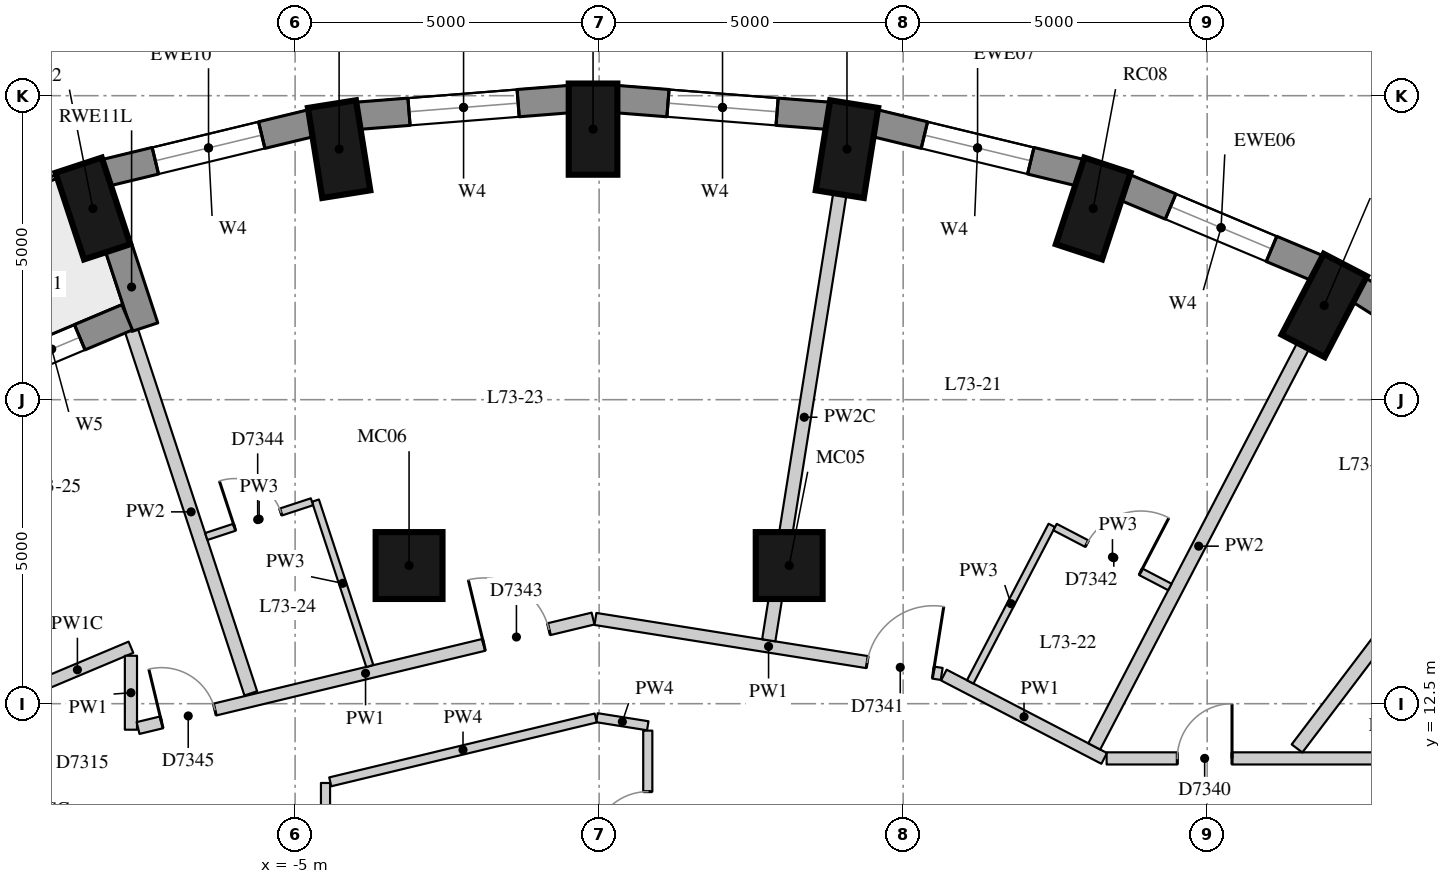
"""IFC4 building model, lengths in metres.
Left out: names, types, materials, properties, quantities, classifications, styles, units other than length and angle.
Written with IfcOpenShell. Run it as: python <this file> out.ifc"""

import sys

from ifc_helpers import new_model, si_unit, direction, frame, frame_2d, origin, origin_2d, place, context, subcontext, project, spatial, rectangle, extrude, element, fill, save


model = new_model("IFC4")
c1 = context("Model", 3, precision=1e-05, world=origin(), true_north=direction((0.0, 1.0)))
c2 = subcontext(c1, "Body", "Model", "MODEL_VIEW")
j1 = project(units=[si_unit("LENGTHUNIT", "METRE"), si_unit("PLANEANGLEUNIT", "RADIAN")], contexts=[c1])
p1 = place(None, origin())
s1 = spatial("IfcSite", under=j1, at=p1, CompositionType="ELEMENT")
p2 = place(p1, origin())
s2 = spatial("IfcBuilding", under=s1, at=p2, CompositionType="ELEMENT")
p3 = place(p2, frame((0.0, 0.0, 256.4)))
s3 = spatial("IfcBuildingStorey", under=s2, at=p3, CompositionType="ELEMENT", Elevation=256.4)
for number, where, z_axis, x_axis in (
    (1, (11.925, 19.05, 0.0), (0.0, 0.0, 1.0), (0.462, 0.887, 0.0)),
    (2, (8.125, 20.644, 0.0), (0.0, 0.0, 1.0), (0.312, 0.95, 0.0)),
    (3, (4.076, 21.621, 0.0), (0.0, 0.0, 1.0), (0.157, 0.988, 0.0)),
    (4, (-0.1, 21.95, 0.0), (0.0, 0.0, 1.0), (0.0, 1.0, 0.0)),
    (5, (-4.276, 21.621, 0.0), (0.0, 0.0, 1.0), (-0.157, 0.988, 0.0)),
    (6, (-8.326, 20.644, 0.0), (0.0, 0.0, 1.0), (-0.312, 0.95, 0.0)),
):
    element("IfcColumn", number, at=place(p3, frame(where, z_axis=z_axis, x_axis=x_axis)), inside=s3, PredefinedType="COLUMN", context=c2, shape_type="SweptSolid", body=[
        extrude(rectangle(XDim=1.5, YDim=0.8, at=origin_2d()), origin(), (0.0, 0.0, 1.0), 3.3),
    ])
for number, where, z_axis, x_axis in (
    (7, (3.126, 14.772, 0.0), (0.0, 0.0, 1.0), (1.0, 0.0, 0.0)),
    (8, (-3.126, 14.772, 0.0), (0.0, 0.0, 1.0), (1.0, 0.0, 0.0)),
):
    element("IfcColumn", number, at=place(p3, frame(where, z_axis=z_axis, x_axis=x_axis)), inside=s3, PredefinedType="COLUMN", context=c2, shape_type="SweptSolid", body=[
        extrude(rectangle(XDim=1.1, YDim=1.1, at=origin_2d()), origin(), (0.0, 0.0, 1.0), 3.3),
    ])
p4 = place(p3, frame((15.353, 17.506, 0.0), z_axis=(0.0, 0.0, 1.0), x_axis=(-0.845929139811, 0.53329531258, 0.0)))
e9 = element("IfcWall", 9, at=p4, inside=s3, PredefinedType="SOLIDWALL", context=c2, shape_type="SweptSolid", body=[
    extrude(rectangle(XDim=3.385, YDim=0.45, at=frame_2d((1.692, 0.0))), origin(), (0.0, 0.0, 1.0), 2.95),
])
p5 = place(p4, frame((0.792, 0.0, 0.4)))
e10 = element("IfcOpeningElement", 10, at=p5, cuts=e9, PredefinedType="OPENING", context=c2, shape_type="SweptSolid", body=[
    extrude(rectangle(XDim=1.8, YDim=1.75, at=frame_2d((0.9, 0.875))), frame((0.0, 0.235, 0.0), z_axis=(0.0, -1.0, 0.0), x_axis=(1.0, 0.0, 0.0)), (0.0, 0.0, 1.0), 0.47),
])
p6 = place(p3, frame((11.816, 19.662, 0.0), z_axis=(0.0, 0.0, 1.0), x_axis=(-0.922024627475, 0.387131226239, 0.0)))
e11 = element("IfcWall", 11, at=p6, inside=s3, PredefinedType="SOLIDWALL", context=c2, shape_type="SweptSolid", body=[
    extrude(rectangle(XDim=3.443, YDim=0.45, at=frame_2d((1.722, 0.0))), origin(), (0.0, 0.0, 1.0), 2.95),
])
p7 = place(p6, frame((0.822, 0.0, 0.4)))
e12 = element("IfcOpeningElement", 12, at=p7, cuts=e11, PredefinedType="OPENING", context=c2, shape_type="SweptSolid", body=[
    extrude(rectangle(XDim=1.8, YDim=1.75, at=frame_2d((0.9, 0.875))), frame((0.0, 0.235, 0.0), z_axis=(0.0, -1.0, 0.0), x_axis=(1.0, 0.0, 0.0)), (0.0, 0.0, 1.0), 0.47),
])
p8 = place(p3, frame((7.919, 21.232, 0.0), z_axis=(0.0, 0.0, 1.0), x_axis=(-0.972099278496, 0.23456980357, 0.0)))
e13 = element("IfcWall", 13, at=p8, inside=s3, PredefinedType="SOLIDWALL", context=c2, shape_type="SweptSolid", body=[
    extrude(rectangle(XDim=3.487, YDim=0.45, at=frame_2d((1.743, 0.0))), origin(), (0.0, 0.0, 1.0), 2.95),
])
p9 = place(p8, frame((0.843, 0.0, 0.4)))
e14 = element("IfcOpeningElement", 14, at=p9, cuts=e13, PredefinedType="OPENING", context=c2, shape_type="SweptSolid", body=[
    extrude(rectangle(XDim=1.8, YDim=1.75, at=frame_2d((0.9, 0.875))), frame((0.0, 0.235, 0.0), z_axis=(0.0, -1.0, 0.0), x_axis=(1.0, 0.0, 0.0)), (0.0, 0.0, 1.0), 0.47),
])
p10 = place(p3, frame((3.779, 22.169, 0.0), z_axis=(0.0, 0.0, 1.0), x_axis=(-0.996910775835, 0.078542377245, 0.0)))
e15 = element("IfcWall", 15, at=p10, inside=s3, PredefinedType="SOLIDWALL", context=c2, shape_type="SweptSolid", body=[
    extrude(rectangle(XDim=3.509, YDim=0.45, at=frame_2d((1.755, 0.0))), origin(), (0.0, 0.0, 1.0), 2.95),
])
p11 = place(p10, frame((0.855, 0.0, 0.4)))
e16 = element("IfcOpeningElement", 16, at=p11, cuts=e15, PredefinedType="OPENING", context=c2, shape_type="SweptSolid", body=[
    extrude(rectangle(XDim=1.8, YDim=1.75, at=frame_2d((0.9, 0.875))), frame((0.0, 0.235, 0.0), z_axis=(0.0, -1.0, 0.0), x_axis=(1.0, 0.0, 0.0)), (0.0, 0.0, 1.0), 0.47),
])
p12 = place(p3, frame((-0.48, 22.444, 0.0), z_axis=(0.0, 0.0, 1.0), x_axis=(-0.996910775835, -0.078542377245, 0.0)))
e17 = element("IfcWall", 17, at=p12, inside=s3, PredefinedType="SOLIDWALL", context=c2, shape_type="SweptSolid", body=[
    extrude(rectangle(XDim=3.509, YDim=0.45, at=frame_2d((1.755, 0.0))), origin(), (0.0, 0.0, 1.0), 2.95),
])
p13 = place(p12, frame((0.855, 0.0, 0.4)))
e18 = element("IfcOpeningElement", 18, at=p13, cuts=e17, PredefinedType="OPENING", context=c2, shape_type="SweptSolid", body=[
    extrude(rectangle(XDim=1.8, YDim=1.75, at=frame_2d((0.9, 0.875))), frame((0.0, 0.235, 0.0), z_axis=(0.0, -1.0, 0.0), x_axis=(1.0, 0.0, 0.0)), (0.0, 0.0, 1.0), 0.47),
])
p14 = place(p3, frame((-4.729, 22.05, 0.0), z_axis=(0.0, 0.0, 1.0), x_axis=(-0.972099278496, -0.23456980357, 0.0)))
e19 = element("IfcWall", 19, at=p14, inside=s3, PredefinedType="SOLIDWALL", context=c2, shape_type="SweptSolid", body=[
    extrude(rectangle(XDim=3.487, YDim=0.45, at=frame_2d((1.743, 0.0))), origin(), (0.0, 0.0, 1.0), 2.95),
])
p15 = place(p14, frame((0.843, 0.0, 0.4)))
e20 = element("IfcOpeningElement", 20, at=p15, cuts=e19, PredefinedType="OPENING", context=c2, shape_type="SweptSolid", body=[
    extrude(rectangle(XDim=1.8, YDim=1.75, at=frame_2d((0.9, 0.875))), frame((0.0, 0.235, 0.0), z_axis=(0.0, -1.0, 0.0), x_axis=(1.0, 0.0, 0.0)), (0.0, 0.0, 1.0), 0.47),
])
p16 = place(p3, frame((-7.906, 20.014, 0.0), z_axis=(0.0, 0.0, 1.0), x_axis=(0.312379684595, -0.949957332017, 0.0)))
e21 = element("IfcWall", 21, at=p16, inside=s3, PredefinedType="SOLIDWALL", context=c2, shape_type="SweptSolid", body=[
    extrude(rectangle(XDim=1.39, YDim=0.45, at=frame_2d((0.695, 0.0))), origin(), (0.0, 0.0, 1.0), 2.95),
])
p17 = place(p3, frame((-7.762, 18.855, 0.0), z_axis=(0.0, 0.0, 1.0), x_axis=(-0.921611451737, -0.388113813239, 0.0)))
e22 = element("IfcWall", 22, at=p17, inside=s3, PredefinedType="SOLIDWALL", context=c2, shape_type="SweptSolid", body=[
    extrude(rectangle(XDim=3.842, YDim=0.45, at=frame_2d((1.921, 0.0))), origin(), (0.0, 0.0, 1.0), 2.95),
])
p18 = place(p17, frame((0.846, 0.0, 0.4)))
e23 = element("IfcOpeningElement", 23, at=p18, cuts=e22, PredefinedType="OPENING", context=c2, shape_type="SweptSolid", body=[
    extrude(rectangle(XDim=1.0, YDim=1.75, at=frame_2d((0.5, 0.875))), frame((0.0, 0.235, 0.0), z_axis=(0.0, -1.0, 0.0), x_axis=(1.0, 0.0, 0.0)), (0.0, 0.0, 1.0), 0.47),
])
p19 = place(p17, frame((1.996, 0.0, 0.0)))
e24 = element("IfcOpeningElement", 24, at=p19, cuts=e22, PredefinedType="OPENING", context=c2, shape_type="SweptSolid", body=[
    extrude(rectangle(XDim=1.0, YDim=2.15, at=frame_2d((0.5, 1.075))), frame((0.0, 0.235, 0.0), z_axis=(0.0, -1.0, 0.0), x_axis=(1.0, 0.0, 0.0)), (0.0, 0.0, 1.0), 0.47),
])
p20 = place(p3, frame((-9.46, 12.687, 0.0), z_axis=(0.0, 0.0, 1.0), x_axis=(0.92164499827, 0.388034144328, 0.0)))
e25 = element("IfcWall", 25, at=p20, inside=s3, PredefinedType="PARTITIONING", context=c2, shape_type="SweptSolid", body=[
    extrude(rectangle(XDim=1.91, YDim=0.2, at=frame_2d((0.955, 0.0))), origin(), (0.0, 0.0, 1.0), 2.5),
])
p21 = place(p3, frame((-7.7, 13.288, 0.0), z_axis=(0.0, 0.0, 1.0), x_axis=(0.0, -1.0, 0.0)))
e26 = element("IfcWall", 26, at=p21, inside=s3, PredefinedType="PARTITIONING", context=c2, shape_type="SweptSolid", body=[
    extrude(rectangle(XDim=1.216, YDim=0.2, at=frame_2d((0.608, 0.0))), origin(), (0.0, 0.0, 1.0), 2.95),
])
p22 = place(p3, frame((-7.583, 12.1, 0.0), z_axis=(0.0, 0.0, 1.0), x_axis=(0.97226305798, 0.233890029903, 0.0)))
e27 = element("IfcWall", 27, at=p22, inside=s3, PredefinedType="PARTITIONING", context=c2, shape_type="SweptSolid", body=[
    extrude(rectangle(XDim=7.696, YDim=0.2, at=frame_2d((3.848, 0.0))), origin(), (0.0, 0.0, 1.0), 2.95),
])
p23 = place(p22, frame((5.85, 0.0, 0.0)))
e28 = element("IfcOpeningElement", 28, at=p23, cuts=e27, PredefinedType="OPENING", context=c2, shape_type="SweptSolid", body=[
    extrude(rectangle(XDim=1.1, YDim=2.1, at=frame_2d((0.55, 1.05))), frame((0.0, 0.11, 0.0), z_axis=(0.0, -1.0, 0.0), x_axis=(1.0, 0.0, 0.0)), (0.0, 0.0, 1.0), 0.22),
])
p24 = place(p22, frame((0.399, 0.0, 0.0)))
e29 = element("IfcOpeningElement", 29, at=p24, cuts=e27, PredefinedType="OPENING", context=c2, shape_type="SweptSolid", body=[
    extrude(rectangle(XDim=0.9, YDim=2.1, at=frame_2d((0.45, 1.05))), frame((0.0, 0.11, 0.0), z_axis=(0.0, -1.0, 0.0), x_axis=(1.0, 0.0, 0.0)), (0.0, 0.0, 1.0), 0.22),
])
p25 = place(p3, frame((-0.061, 13.894, 0.0), z_axis=(0.0, 0.0, 1.0), x_axis=(0.987623870558, -0.156840971383, 0.0)))
e30 = element("IfcWall", 30, at=p25, inside=s3, PredefinedType="PARTITIONING", context=c2, shape_type="SweptSolid", body=[
    extrude(rectangle(XDim=5.766, YDim=0.2, at=frame_2d((2.883, 0.0))), origin(), (0.0, 0.0, 1.0), 2.95),
])
p26 = place(p25, frame((4.526, 0.0, 0.0)))
e31 = element("IfcOpeningElement", 31, at=p26, cuts=e30, PredefinedType="OPENING", context=c2, shape_type="SweptSolid", body=[
    extrude(rectangle(XDim=1.1, YDim=2.1, at=frame_2d((0.55, 1.05))), frame((0.0, 0.11, 0.0), z_axis=(0.0, -1.0, 0.0), x_axis=(1.0, 0.0, 0.0)), (0.0, 0.0, 1.0), 0.22),
])
p27 = place(p3, frame((5.669, 12.971, 0.0), z_axis=(0.0, 0.0, 1.0), x_axis=(0.887284047921, -0.461223393058, 0.0)))
e32 = element("IfcWall", 32, at=p27, inside=s3, PredefinedType="PARTITIONING", context=c2, shape_type="SweptSolid", body=[
    extrude(rectangle(XDim=2.972, YDim=0.2, at=frame_2d((1.486, 0.0))), origin(), (0.0, 0.0, 1.0), 2.95),
])
p28 = place(p3, frame((8.346, 11.6, 0.0), z_axis=(0.0, 0.0, 1.0), x_axis=(1.0, 0.0, 0.0)))
e33 = element("IfcWall", 33, at=p28, inside=s3, PredefinedType="PARTITIONING", context=c2, shape_type="SweptSolid", body=[
    extrude(rectangle(XDim=9.254, YDim=0.2, at=frame_2d((4.627, 0.0))), origin(), (0.0, 0.0, 1.0), 2.95),
])
p29 = place(p28, frame((1.162, 0.0, 0.0)))
e34 = element("IfcOpeningElement", 34, at=p29, cuts=e33, PredefinedType="OPENING", context=c2, shape_type="SweptSolid", body=[
    extrude(rectangle(XDim=0.9, YDim=2.1, at=frame_2d((0.45, 1.05))), frame((0.0, 0.11, 0.0), z_axis=(0.0, -1.0, 0.0), x_axis=(1.0, 0.0, 0.0)), (0.0, 0.0, 1.0), 0.22),
])
p30 = place(p28, frame((5.224, 0.0, 0.0)))
e35 = element("IfcOpeningElement", 35, at=p30, cuts=e33, PredefinedType="OPENING", context=c2, shape_type="SweptSolid", body=[
    extrude(rectangle(XDim=1.8, YDim=2.1, at=frame_2d((0.9, 1.05))), frame((0.0, 0.11, 0.0), z_axis=(0.0, -1.0, 0.0), x_axis=(1.0, 0.0, 0.0)), (0.0, 0.0, 1.0), 0.22),
])
p31 = place(p3, frame((-0.036, 12.27, 0.0), z_axis=(0.0, 0.0, 1.0), x_axis=(0.987612834354, -0.156910450318, 0.0)))
e36 = element("IfcWall", 36, at=p31, inside=s3, PredefinedType="PARTITIONING", context=c2, shape_type="SweptSolid", body=[
    extrude(rectangle(XDim=0.846, YDim=0.15, at=frame_2d((0.423, 0.0))), origin(), (0.0, 0.0, 1.0), 2.95),
])
p32 = place(p3, frame((0.8, 12.057, 0.0), z_axis=(0.0, 0.0, 1.0), x_axis=(0.0, -1.0, 0.0)))
e37 = element("IfcWall", 37, at=p32, inside=s3, PredefinedType="PARTITIONING", context=c2, shape_type="SweptSolid", body=[
    extrude(rectangle(XDim=2.907, YDim=0.15, at=frame_2d((1.454, 0.0))), origin(), (0.0, 0.0, 1.0), 2.95),
])
p33 = place(p32, frame((1.003, 0.0, 0.0)))
e38 = element("IfcOpeningElement", 38, at=p33, cuts=e37, PredefinedType="OPENING", context=c2, shape_type="SweptSolid", body=[
    extrude(rectangle(XDim=0.9, YDim=2.1, at=frame_2d((0.45, 1.05))), frame((0.0, 0.085, 0.0), z_axis=(0.0, -1.0, 0.0), x_axis=(1.0, 0.0, 0.0)), (0.0, 0.0, 1.0), 0.17),
])
p34 = place(p3, frame((-4.5, 8.563, 0.0), z_axis=(0.0, 0.0, 1.0), x_axis=(0.0, 1.0, 0.0)))
e39 = element("IfcWall", 39, at=p34, inside=s3, PredefinedType="PARTITIONING", context=c2, shape_type="SweptSolid", body=[
    extrude(rectangle(XDim=2.633, YDim=0.15, at=frame_2d((1.316, 0.0))), origin(), (0.0, 0.0, 1.0), 2.95),
])
p35 = place(p3, frame((-4.422, 11.215, 0.0), z_axis=(0.0, 0.0, 1.0), x_axis=(0.972256385538, 0.233917764997, 0.0)))
e40 = element("IfcWall", 40, at=p35, inside=s3, PredefinedType="PARTITIONING", context=c2, shape_type="SweptSolid", body=[
    extrude(rectangle(XDim=4.491, YDim=0.15, at=frame_2d((2.246, 0.0))), origin(), (0.0, 0.0, 1.0), 2.95),
])
p36 = place(p3, frame((14.906, 16.287, 0.0), z_axis=(0.0, 0.0, 1.0), x_axis=(-0.604066355306, -0.796934023861, 0.0)))
e41 = element("IfcWall", 41, at=p36, inside=s3, PredefinedType="PARTITIONING", context=c2, shape_type="SweptSolid", body=[
    extrude(rectangle(XDim=5.676, YDim=0.22, at=frame_2d((2.838, 0.0))), origin(), (0.0, 0.0, 1.0), 2.95),
])
p37 = place(p3, frame((11.578, 18.385, 0.0), z_axis=(0.0, 0.0, 1.0), x_axis=(-0.462371689287, -0.886686202073, 0.0)))
e42 = element("IfcWall", 42, at=p37, inside=s3, PredefinedType="PARTITIONING", context=c2, shape_type="SweptSolid", body=[
    extrude(rectangle(XDim=7.429, YDim=0.22, at=frame_2d((3.714, 0.0))), origin(), (0.0, 0.0, 1.0), 2.95),
])
p38 = place(p3, frame((3.958, 20.88, 0.0), z_axis=(0.0, 0.0, 1.0), x_axis=(-0.157281826031, -0.987553759144, 0.0)))
e43 = element("IfcWall", 43, at=p38, inside=s3, PredefinedType="PARTITIONING", context=c2, shape_type="SweptSolid", body=[
    extrude(rectangle(XDim=7.431, YDim=0.22, at=frame_2d((3.715, 0.0))), origin(), (0.0, 0.0, 1.0), 2.5),
])
p39 = place(p3, frame((-7.692, 18.64, 0.0), z_axis=(0.0, 0.0, 1.0), x_axis=(0.312298025569, -0.949984180514, 0.0)))
e44 = element("IfcWall", 44, at=p39, inside=s3, PredefinedType="PARTITIONING", context=c2, shape_type="SweptSolid", body=[
    extrude(rectangle(XDim=6.285, YDim=0.22, at=frame_2d((3.143, 0.0))), origin(), (0.0, 0.0, 1.0), 2.95),
])
p40 = place(p3, frame((6.103, 12.858, 0.0), z_axis=(0.0, 0.0, 1.0), x_axis=(0.462353319711, 0.886695780836, 0.0)))
e45 = element("IfcWall", 45, at=p40, inside=s3, PredefinedType="PARTITIONING", context=c2, shape_type="SweptSolid", body=[
    extrude(rectangle(XDim=2.903, YDim=0.12, at=frame_2d((1.452, 0.0))), origin(), (0.0, 0.0, 1.0), 2.95),
])
p41 = place(p3, frame((-3.771, 13.12, 0.0), z_axis=(0.0, 0.0, 1.0), x_axis=(-0.312336886671, 0.949971404425, 0.0)))
e46 = element("IfcWall", 46, at=p41, inside=s3, PredefinedType="PARTITIONING", context=c2, shape_type="SweptSolid", body=[
    extrude(rectangle(XDim=2.863, YDim=0.12, at=frame_2d((1.432, 0.0))), origin(), (0.0, 0.0, 1.0), 2.95),
])
p42 = place(p3, frame((7.498, 15.405, 0.0), z_axis=(0.0, 0.0, 1.0), x_axis=(0.886662502683, -0.46241713456, 0.0)))
e47 = element("IfcWall", 47, at=p42, inside=s3, PredefinedType="PARTITIONING", context=c2, shape_type="SweptSolid", body=[
    extrude(rectangle(XDim=2.13, YDim=0.12, at=frame_2d((1.065, 0.0))), origin(), (0.0, 0.0, 1.0), 2.95),
])
p43 = place(p42, frame((0.59, 0.0, 0.0)))
e48 = element("IfcOpeningElement", 48, at=p43, cuts=e47, PredefinedType="OPENING", context=c2, shape_type="SweptSolid", body=[
    extrude(rectangle(XDim=1.0, YDim=2.1, at=frame_2d((0.5, 1.05))), frame((0.0, 0.07, 0.0), z_axis=(0.0, -1.0, 0.0), x_axis=(1.0, 0.0, 0.0)), (0.0, 0.0, 1.0), 0.14),
])
p44 = place(p3, frame((-4.722, 15.821, 0.0), z_axis=(0.0, 0.0, 1.0), x_axis=(-0.949995576072, -0.312263359111, 0.0)))
e49 = element("IfcWall", 49, at=p44, inside=s3, PredefinedType="PARTITIONING", context=c2, shape_type="SweptSolid", body=[
    extrude(rectangle(XDim=1.83, YDim=0.12, at=frame_2d((0.915, 0.0))), origin(), (0.0, 0.0, 1.0), 2.95),
])
p45 = place(p44, frame((0.54, 0.0, 0.0)))
e50 = element("IfcOpeningElement", 50, at=p45, cuts=e49, PredefinedType="OPENING", context=c2, shape_type="SweptSolid", body=[
    extrude(rectangle(XDim=0.8, YDim=2.1, at=frame_2d((0.4, 1.05))), frame((0.0, 0.07, 0.0), z_axis=(0.0, -1.0, 0.0), x_axis=(1.0, 0.0, 0.0)), (0.0, 0.0, 1.0), 0.14),
])
p46 = place(p7, origin())
e51 = element("IfcWindow", 51, at=p46, inside=s3, PartitioningType="SINGLE_PANEL", PredefinedType="WINDOW", context=c2, shape_type="SweptSolid", body=[
    extrude(rectangle(XDim=1.8, YDim=1.75, at=frame_2d((0.9, 0.875))), frame((0.0, 0.035, 0.0), z_axis=(0.0, -1.0, 0.0), x_axis=(1.0, 0.0, 0.0)), (0.0, 0.0, 1.0), 0.06),
])
fill(e12, e51)
p47 = place(p9, origin())
e52 = element("IfcWindow", 52, at=p47, inside=s3, PartitioningType="SINGLE_PANEL", PredefinedType="WINDOW", context=c2, shape_type="SweptSolid", body=[
    extrude(rectangle(XDim=1.8, YDim=1.75, at=frame_2d((0.9, 0.875))), frame((0.0, 0.035, 0.0), z_axis=(0.0, -1.0, 0.0), x_axis=(1.0, 0.0, 0.0)), (0.0, 0.0, 1.0), 0.06),
])
fill(e14, e52)
p48 = place(p11, origin())
e53 = element("IfcWindow", 53, at=p48, inside=s3, PartitioningType="SINGLE_PANEL", PredefinedType="WINDOW", context=c2, shape_type="SweptSolid", body=[
    extrude(rectangle(XDim=1.8, YDim=1.75, at=frame_2d((0.9, 0.875))), frame((0.0, 0.035, 0.0), z_axis=(0.0, -1.0, 0.0), x_axis=(1.0, 0.0, 0.0)), (0.0, 0.0, 1.0), 0.06),
])
fill(e16, e53)
p49 = place(p13, origin())
e54 = element("IfcWindow", 54, at=p49, inside=s3, PartitioningType="SINGLE_PANEL", PredefinedType="WINDOW", context=c2, shape_type="SweptSolid", body=[
    extrude(rectangle(XDim=1.8, YDim=1.75, at=frame_2d((0.9, 0.875))), frame((0.0, 0.035, 0.0), z_axis=(0.0, -1.0, 0.0), x_axis=(1.0, 0.0, 0.0)), (0.0, 0.0, 1.0), 0.06),
])
fill(e18, e54)
p50 = place(p15, origin())
e55 = element("IfcWindow", 55, at=p50, inside=s3, PartitioningType="SINGLE_PANEL", PredefinedType="WINDOW", context=c2, shape_type="SweptSolid", body=[
    extrude(rectangle(XDim=1.8, YDim=1.75, at=frame_2d((0.9, 0.875))), frame((0.0, 0.035, 0.0), z_axis=(0.0, -1.0, 0.0), x_axis=(1.0, 0.0, 0.0)), (0.0, 0.0, 1.0), 0.06),
])
fill(e20, e55)
p51 = place(p18, origin())
e56 = element("IfcWindow", 56, at=p51, inside=s3, PartitioningType="SINGLE_PANEL", PredefinedType="WINDOW", context=c2, shape_type="SweptSolid", body=[
    extrude(rectangle(XDim=1.0, YDim=1.75, at=frame_2d((0.5, 0.875))), frame((0.0, 0.035, 0.0), z_axis=(0.0, -1.0, 0.0), x_axis=(1.0, 0.0, 0.0)), (0.0, 0.0, 1.0), 0.06),
])
fill(e23, e56)
p52 = place(p29, origin())
e57 = element("IfcDoor", 57, at=p52, inside=s3, OperationType="SINGLE_SWING_RIGHT", PredefinedType="DOOR", context=c2, shape_type="SweptSolid", body=[
    extrude(rectangle(XDim=0.9, YDim=2.1, at=frame_2d((0.45, 1.05))), frame((0.0, 0.025, 0.0), z_axis=(0.0, -1.0, 0.0), x_axis=(1.0, 0.0, 0.0)), (0.0, 0.0, 1.0), 0.05),
])
fill(e34, e57)
p53 = place(p26, origin())
e58 = element("IfcDoor", 58, at=p53, inside=s3, OperationType="SINGLE_SWING_RIGHT", PredefinedType="DOOR", context=c2, shape_type="SweptSolid", body=[
    extrude(rectangle(XDim=1.1, YDim=2.1, at=frame_2d((0.55, 1.05))), frame((0.0, 0.025, 0.0), z_axis=(0.0, -1.0, 0.0), x_axis=(1.0, 0.0, 0.0)), (0.0, 0.0, 1.0), 0.05),
])
fill(e31, e58)
p54 = place(p43, origin())
e59 = element("IfcDoor", 59, at=p54, inside=s3, OperationType="SINGLE_SWING_RIGHT", PredefinedType="DOOR", context=c2, shape_type="SweptSolid", body=[
    extrude(rectangle(XDim=1.0, YDim=2.1, at=frame_2d((0.5, 1.05))), frame((0.0, 0.025, 0.0), z_axis=(0.0, -1.0, 0.0), x_axis=(1.0, 0.0, 0.0)), (0.0, 0.0, 1.0), 0.05),
])
fill(e48, e59)
p55 = place(p23, origin())
e60 = element("IfcDoor", 60, at=p55, inside=s3, OperationType="SINGLE_SWING_LEFT", PredefinedType="DOOR", context=c2, shape_type="SweptSolid", body=[
    extrude(rectangle(XDim=1.1, YDim=2.1, at=frame_2d((0.55, 1.05))), frame((0.0, 0.025, 0.0), z_axis=(0.0, -1.0, 0.0), x_axis=(1.0, 0.0, 0.0)), (0.0, 0.0, 1.0), 0.05),
])
fill(e28, e60)
p56 = place(p45, origin())
e61 = element("IfcDoor", 61, at=p56, inside=s3, OperationType="SINGLE_SWING_LEFT", PredefinedType="DOOR", context=c2, shape_type="SweptSolid", body=[
    extrude(rectangle(XDim=0.8, YDim=2.1, at=frame_2d((0.4, 1.05))), frame((0.0, 0.025, 0.0), z_axis=(0.0, -1.0, 0.0), x_axis=(1.0, 0.0, 0.0)), (0.0, 0.0, 1.0), 0.05),
])
fill(e50, e61)
p57 = place(p24, origin())
e62 = element("IfcDoor", 62, at=p57, inside=s3, OperationType="SINGLE_SWING_LEFT", PredefinedType="DOOR", context=c2, shape_type="SweptSolid", body=[
    extrude(rectangle(XDim=0.9, YDim=2.1, at=frame_2d((0.45, 1.05))), frame((0.0, 0.025, 0.0), z_axis=(0.0, -1.0, 0.0), x_axis=(1.0, 0.0, 0.0)), (0.0, 0.0, 1.0), 0.05),
])
fill(e29, e62)
p58 = place(p33, origin())
e63 = element("IfcDoor", 63, at=p58, inside=s3, OperationType="SINGLE_SWING_LEFT", PredefinedType="DOOR", context=c2, shape_type="SweptSolid", body=[
    extrude(rectangle(XDim=0.9, YDim=2.1, at=frame_2d((0.45, 1.05))), frame((0.0, 0.025, 0.0), z_axis=(0.0, -1.0, 0.0), x_axis=(1.0, 0.0, 0.0)), (0.0, 0.0, 1.0), 0.05),
])
fill(e38, e63)
save(model, sys.argv[1])
